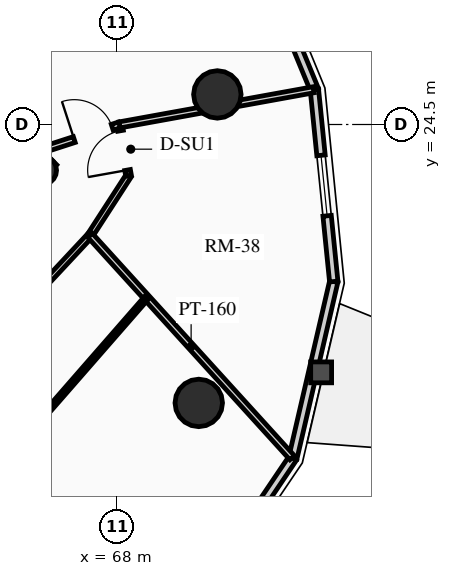
"""IFC4 building model, lengths in metres.
Left out: names, types, materials, properties, quantities, classifications, styles, units other than length and angle.
Written with IfcOpenShell. Run it as: python <this file> out.ifc"""

import sys

from ifc_helpers import new_model, si_unit, direction, frame, frame_2d, origin, origin_2d, place, context, subcontext, project, spatial, rectangle, circle, hollow_circle, extrude, source, transform, mapped, element, fill, save


model = new_model("IFC4")
c1 = context("Model", 3, precision=1e-05, world=origin(), true_north=direction((0.0, 1.0)))
c2 = subcontext(c1, "Body", "Model", "MODEL_VIEW")
j1 = project(units=[si_unit("LENGTHUNIT", "METRE"), si_unit("PLANEANGLEUNIT", "RADIAN")], contexts=[c1])
p1 = place(None, origin())
s1 = spatial("IfcSite", under=j1, at=p1, CompositionType="ELEMENT")
p2 = place(p1, origin())
s2 = spatial("IfcBuilding", under=s1, at=p2, CompositionType="ELEMENT")
p3 = place(p2, frame((0.0, 0.0, 163.24)))
s3 = spatial("IfcBuildingStorey", under=s2, at=p3, CompositionType="ELEMENT", Elevation=163.24)
p4 = place(p3, frame((66.268, 23.298, 0.0), z_axis=(0.0, 0.0, 1.0), x_axis=(-0.707106781187, 0.707106781187, 0.0)))
e1 = element("IfcWall", 1, at=p4, inside=s3, PredefinedType="SHEAR", context=c2, shape_type="SweptSolid", body=[
    extrude(rectangle(XDim=14.1, YDim=0.4, at=frame_2d((7.05, 0.0))), origin(), (0.0, 0.0, 1.0), 2.91),
])
p5 = place(p3, frame((66.024, 23.294, 0.0), z_axis=(0.0, 0.0, 1.0), x_axis=(0.707106781187, 0.707106781187, 0.0)))
e2 = element("IfcColumn", 2, at=p5, inside=s3, PredefinedType="COLUMN", context=c2, shape_type="SweptSolid", body=[
    extrude(hollow_circle(Radius=0.38, WallThickness=0.032, at=origin_2d()), origin(), (0.0, 0.0, 1.0), 2.91),
])
for number, where, z_axis, x_axis in (
    (3, (70.146, 17.173, 0.0), (0.0, 0.0, 1.0), (1.0, 0.0, 0.0)),
    (4, (70.635, 25.291, 0.0), (0.0, 0.0, 1.0), (1.0, 0.0, 0.0)),
):
    element("IfcColumn", number, at=place(p3, frame(where, z_axis=z_axis, x_axis=x_axis)), inside=s3, PredefinedType="USERDEFINED", context=c2, shape_type="SweptSolid", body=[
        extrude(circle(Radius=0.625, at=origin_2d()), origin(), (0.0, 0.0, 1.0), 2.91),
    ])
p6 = place(p3, frame((72.622, 15.721, 0.0), z_axis=(0.0, 0.0, 1.0), x_axis=(-0.559635286042, -0.828739009952, 0.0)))
e5 = element("IfcWall", 5, at=p6, inside=s3, PredefinedType="SOLIDWALL", context=c2, shape_type="SweptSolid", body=[
    extrude(rectangle(XDim=4.569, YDim=0.22, at=frame_2d((2.284, 0.0))), origin(), (0.0, 0.0, 1.0), 2.245),
])
m1 = source(origin(), c2, "Body", "SweptSolid", [
    extrude(rectangle(XDim=1.6, YDim=1.3, at=frame_2d((0.8, 0.65))), frame((0.0, 0.12, 0.0), z_axis=(0.0, -1.0, 0.0), x_axis=(1.0, 0.0, 0.0)), (0.0, 0.0, 1.0), 0.24),
])
p7 = place(p6, frame((1.484, 0.0, 0.65)))
e6 = element("IfcOpeningElement", 6, at=p7, cuts=e5, PredefinedType="OPENING", context=c2, shape_type="MappedRepresentation", body=[
    mapped(m1, transform((0.0, 0.0, 0.0), x_axis=(1.0, 0.0, 0.0), y_axis=(0.0, 1.0, 0.0), z_axis=(0.0, 0.0, 1.0), scale=1.0)),
])
p8 = place(p3, frame((73.698, 20.367, 0.0), z_axis=(0.0, 0.0, 1.0), x_axis=(-0.225659540039, -0.974206226622, 0.0)))
e7 = element("IfcWall", 7, at=p8, inside=s3, PredefinedType="SOLIDWALL", context=c2, shape_type="SweptSolid", body=[
    extrude(rectangle(XDim=4.769, YDim=0.22, at=frame_2d((2.385, 0.0))), origin(), (0.0, 0.0, 1.0), 2.245),
])
p9 = place(p3, frame((73.189, 25.418, 0.0), z_axis=(0.0, 0.0, 1.0), x_axis=(0.100279889424, -0.994959267396, 0.0)))
e8 = element("IfcWall", 8, at=p9, inside=s3, PredefinedType="SOLIDWALL", context=c2, shape_type="SweptSolid", body=[
    extrude(rectangle(XDim=5.076, YDim=0.22, at=frame_2d((2.538, 0.0))), origin(), (0.0, 0.0, 1.0), 2.245),
])
p10 = place(p9, frame((1.738, 0.0, 0.65)))
e9 = element("IfcOpeningElement", 9, at=p10, cuts=e8, PredefinedType="OPENING", context=c2, shape_type="MappedRepresentation", body=[
    mapped(m1, transform((0.0, 0.0, 0.0), x_axis=(1.0, 0.0, 0.0), y_axis=(0.0, 1.0, 0.0), z_axis=(0.0, 0.0, 1.0), scale=1.0)),
])
p11 = place(p3, frame((71.144, 30.378, 0.0), z_axis=(0.0, 0.0, 1.0), x_axis=(0.38111364655, -0.924528197738, 0.0)))
e10 = element("IfcWall", 10, at=p11, inside=s3, PredefinedType="SOLIDWALL", context=c2, shape_type="SweptSolid", body=[
    extrude(rectangle(XDim=5.366, YDim=0.22, at=frame_2d((2.683, 0.0))), origin(), (0.0, 0.0, 1.0), 2.245),
])
p12 = place(p3, frame((62.812, 16.788, 0.0), z_axis=(0.0, 0.0, 1.0), x_axis=(0.682323555485, 0.731050316757, 0.0)))
e11 = element("IfcWall", 11, at=p12, inside=s3, PredefinedType="PARTITIONING", context=c2, shape_type="SweptSolid", body=[
    extrude(rectangle(XDim=6.559, YDim=0.15, at=frame_2d((3.279, 0.0))), origin(), (0.0, 0.0, 1.0), 2.245),
])
p13 = place(p3, frame((67.287, 21.582, 0.0), z_axis=(0.0, 0.0, 1.0), x_axis=(0.543202443884, 0.839601753785, 0.0)))
e12 = element("IfcWall", 12, at=p13, inside=s3, PredefinedType="PARTITIONING", context=c2, shape_type="SweptSolid", body=[
    extrude(rectangle(XDim=1.866, YDim=0.15, at=frame_2d((0.933, 0.0))), origin(), (0.0, 0.0, 1.0), 2.245),
])
p14 = place(p3, frame((68.3, 23.149, 0.0), z_axis=(0.0, 0.0, 1.0), x_axis=(-0.176423554694, 0.984314344785, 0.0)))
e13 = element("IfcWall", 13, at=p14, inside=s3, PredefinedType="PARTITIONING", context=c2, shape_type="SweptSolid", body=[
    extrude(rectangle(XDim=1.362, YDim=0.15, at=frame_2d((0.681, 0.0))), origin(), (0.0, 0.0, 1.0), 2.245),
])
m2 = source(origin(), c2, "Body", "SweptSolid", [
    extrude(rectangle(XDim=1.05, YDim=2.015, at=frame_2d((0.525, 1.007))), frame((0.0, 0.085, 0.0), z_axis=(0.0, -1.0, 0.0), x_axis=(1.0, 0.0, 0.0)), (0.0, 0.0, 1.0), 0.17),
])
p15 = place(p14, frame((0.156, 0.0, 0.0)))
e14 = element("IfcOpeningElement", 14, at=p15, cuts=e13, PredefinedType="OPENING", context=c2, shape_type="MappedRepresentation", body=[
    mapped(m2, transform((0.0, 0.0, 0.0), x_axis=(1.0, 0.0, 0.0), y_axis=(0.0, 1.0, 0.0), z_axis=(0.0, 0.0, 1.0), scale=1.0)),
])
p16 = place(p3, frame((67.287, 21.582, 0.0), z_axis=(0.0, 0.0, 1.0), x_axis=(0.672520632772, -0.740078373212, 0.0)))
e15 = element("IfcWall", 15, at=p16, inside=s3, PredefinedType="PARTITIONING", context=c2, shape_type="SweptSolid", body=[
    extrude(rectangle(XDim=7.907, YDim=0.16, at=frame_2d((3.954, 0.0))), origin(), (0.0, 0.0, 1.0), 2.245),
])
p17 = place(p3, frame((68.06, 24.489, 0.0), z_axis=(0.0, 0.0, 1.0), x_axis=(0.983987798657, 0.178235832802, 0.0)))
e16 = element("IfcWall", 16, at=p17, inside=s3, PredefinedType="PARTITIONING", context=c2, shape_type="SweptSolid", body=[
    extrude(rectangle(XDim=5.193, YDim=0.16, at=frame_2d((2.596, 0.0))), origin(), (0.0, 0.0, 1.0), 2.245),
])
p18 = place(p3, frame((66.021, 23.828, 0.0), z_axis=(0.0, 0.0, 1.0), x_axis=(0.951292345965, 0.308290240695, 0.0)))
e17 = element("IfcWall", 17, at=p18, inside=s3, PredefinedType="PARTITIONING", context=c2, shape_type="SweptSolid", body=[
    extrude(rectangle(XDim=2.144, YDim=0.16, at=frame_2d((1.072, 0.0))), origin(), (0.0, 0.0, 1.0), 2.245),
])
m3 = source(origin(), c2, "Body", "SweptSolid", [
    extrude(rectangle(XDim=1.05, YDim=2.015, at=frame_2d((0.525, 1.007))), frame((0.0, 0.09, 0.0), z_axis=(0.0, -1.0, 0.0), x_axis=(1.0, 0.0, 0.0)), (0.0, 0.0, 1.0), 0.18),
])
p19 = place(p18, frame((0.894, 0.0, 0.0)))
e18 = element("IfcOpeningElement", 18, at=p19, cuts=e17, PredefinedType="OPENING", context=c2, shape_type="MappedRepresentation", body=[
    mapped(m3, transform((0.0, 0.0, 0.0), x_axis=(1.0, 0.0, 0.0), y_axis=(0.0, 1.0, 0.0), z_axis=(0.0, 0.0, 1.0), scale=1.0)),
])
p20 = place(p3, frame((64.839, 15.433, 0.0), z_axis=(0.0, 0.0, 1.0), x_axis=(0.657505208165, 0.753449999161, 0.0)))
e19 = element("IfcWall", 19, at=p20, inside=s3, PredefinedType="PARTITIONING", context=c2, shape_type="SweptSolid", body=[
    extrude(rectangle(XDim=5.988, YDim=0.125, at=frame_2d((2.994, 0.0))), origin(), (0.0, 0.0, 1.0), 2.245),
])
m4 = source(origin(), c2, "Body", "SweptSolid", [
    extrude(rectangle(XDim=1.6, YDim=1.3, at=frame_2d((0.8, 0.65))), frame((0.0, 0.03, 0.0), z_axis=(0.0, -1.0, 0.0), x_axis=(1.0, 0.0, 0.0)), (0.0, 0.0, 1.0), 0.06),
])
p21 = place(p10, origin())
e20 = element("IfcWindow", 20, at=p21, inside=s3, PartitioningType="SINGLE_PANEL", PredefinedType="WINDOW", context=c2, shape_type="MappedRepresentation", body=[
    mapped(m4, transform((0.0, 0.0, 0.0), x_axis=(1.0, 0.0, 0.0), y_axis=(0.0, 1.0, 0.0), z_axis=(0.0, 0.0, 1.0), scale=1.0)),
])
fill(e9, e20)
m5 = source(origin(), c2, "Body", "SweptSolid", [
    extrude(rectangle(XDim=1.05, YDim=2.015, at=frame_2d((0.525, 1.007))), frame((0.0, 0.025, 0.0), z_axis=(0.0, -1.0, 0.0), x_axis=(1.0, 0.0, 0.0)), (0.0, 0.0, 1.0), 0.05),
])
p22 = place(p19, origin())
e21 = element("IfcDoor", 21, at=p22, inside=s3, OperationType="SINGLE_SWING_LEFT", PredefinedType="DOOR", context=c2, shape_type="MappedRepresentation", body=[
    mapped(m5, transform((0.0, 0.0, 0.0), x_axis=(1.0, 0.0, 0.0), y_axis=(0.0, 1.0, 0.0), z_axis=(0.0, 0.0, 1.0), scale=1.0)),
])
fill(e18, e21)
p23 = place(p15, origin())
e22 = element("IfcDoor", 22, at=p23, inside=s3, OperationType="SINGLE_SWING_LEFT", PredefinedType="DOOR", context=c2, shape_type="MappedRepresentation", body=[
    mapped(m5, transform((0.0, 0.0, 0.0), x_axis=(1.0, 0.0, 0.0), y_axis=(0.0, 1.0, 0.0), z_axis=(0.0, 0.0, 1.0), scale=1.0)),
])
fill(e14, e22)
save(model, sys.argv[1])
